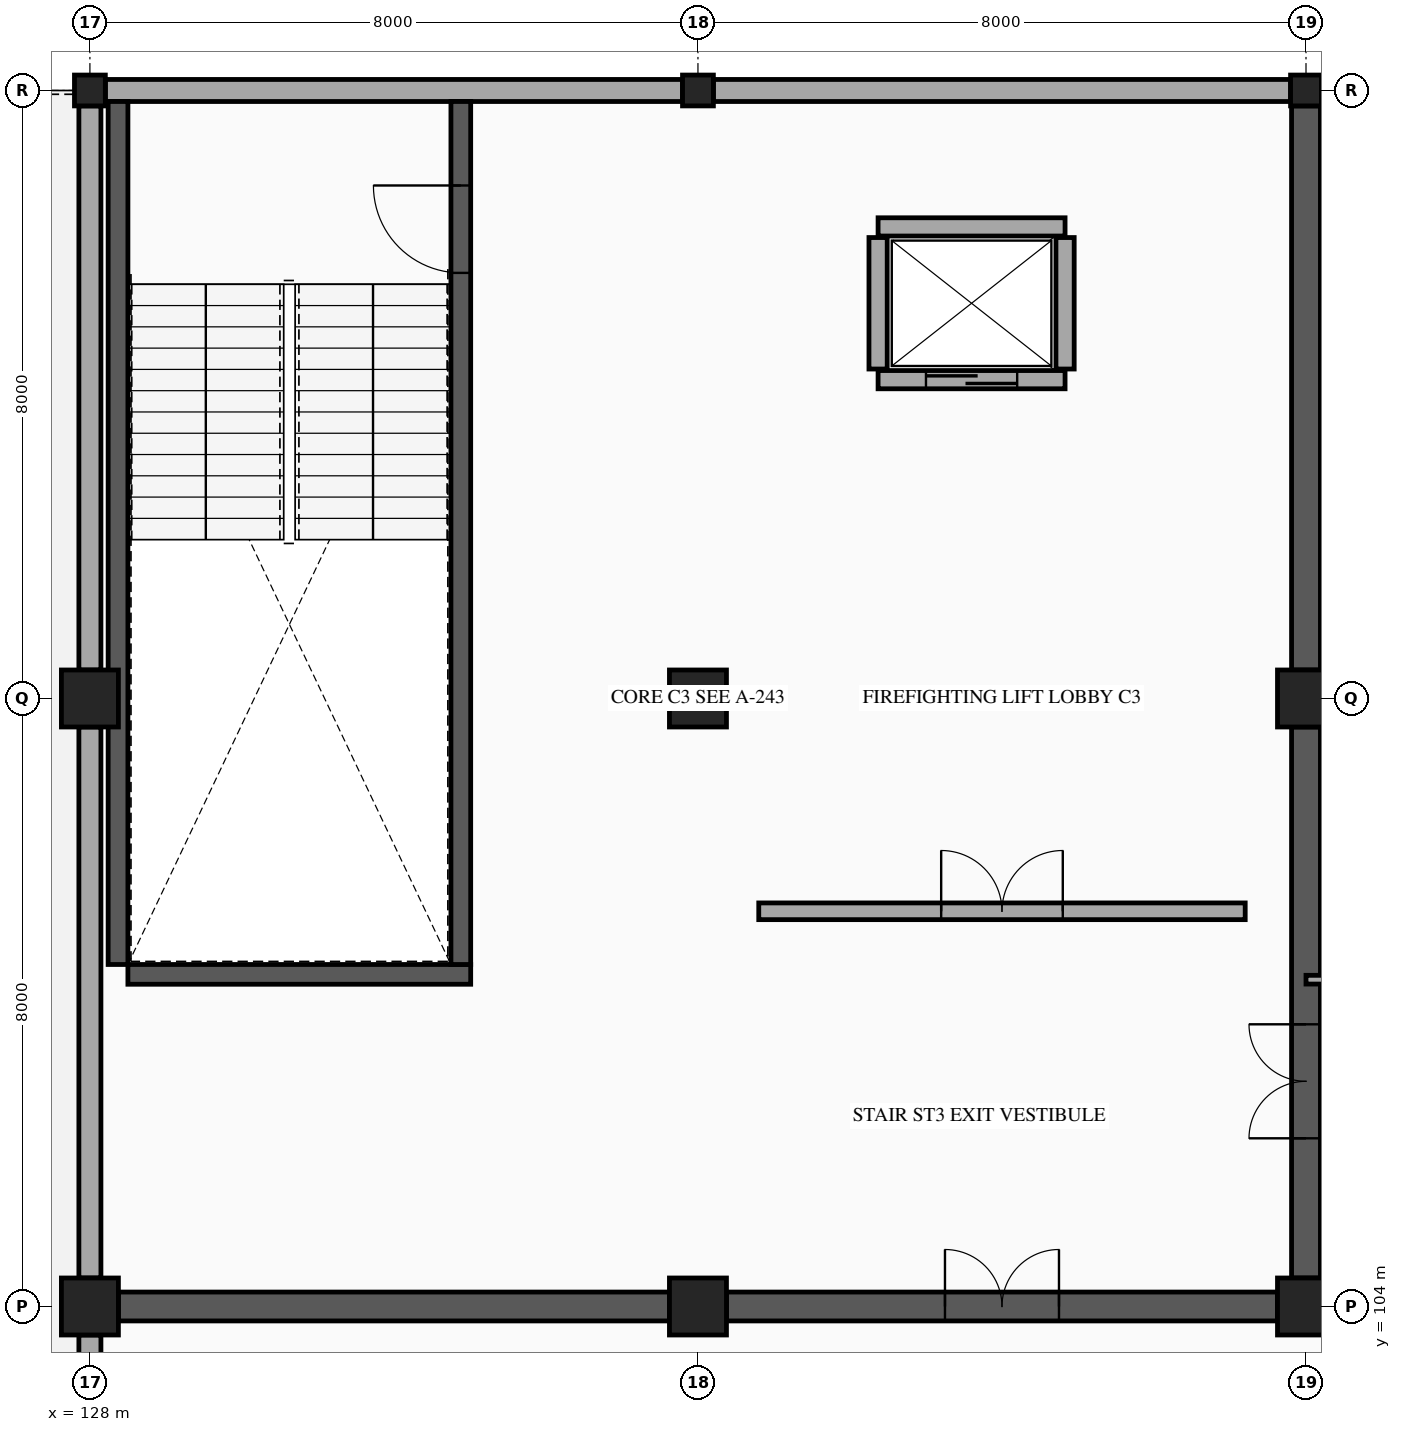
"""IFC4 building model, lengths in metres.
Left out: names, types, materials, properties, quantities, classifications, styles, units other than length and angle.
Written with IfcOpenShell. Run it as: python <this file> out.ifc"""

import sys

from ifc_helpers import new_model, si_unit, direction, frame, frame_2d, origin, origin_2d, place, context, subcontext, project, spatial, rectangle, hollow_rectangle, extrude, element, fill, save


model = new_model("IFC4")
c1 = context("Model", 3, precision=1e-05, world=origin(), true_north=direction((0.0, 1.0)))
c2 = subcontext(c1, "Body", "Model", "MODEL_VIEW")
j1 = project(units=[si_unit("LENGTHUNIT", "METRE"), si_unit("PLANEANGLEUNIT", "RADIAN")], contexts=[c1])
p1 = place(None, origin())
s1 = spatial("IfcSite", under=j1, at=p1, CompositionType="ELEMENT")
p2 = place(p1, origin())
s2 = spatial("IfcBuilding", under=s1, at=p2, CompositionType="ELEMENT")
p3 = place(p2, frame((0.0, 0.0, 19.4)))
s3 = spatial("IfcBuildingStorey", under=s2, at=p3, CompositionType="ELEMENT", Elevation=19.4)
for number, where, z_axis, x_axis in (
    (1, (128.0, 104.0, 0.0), (0.0, 0.0, 1.0), (1.0, 0.0, 0.0)),
    (2, (128.0, 112.0, 0.0), (0.0, 0.0, 1.0), (1.0, 0.0, 0.0)),
):
    element("IfcColumn", number, at=place(p3, frame(where, z_axis=z_axis, x_axis=x_axis)), inside=s3, PredefinedType="COLUMN", context=c2, shape_type="SweptSolid", body=[
        extrude(rectangle(XDim=0.75, YDim=0.75, at=origin_2d()), origin(), (0.0, 0.0, 1.0), 4.5),
    ])
p4 = place(p3, frame((128.0, 120.0, 0.0), z_axis=(0.0, 0.0, 1.0), x_axis=(1.0, 0.0, 0.0)))
e3 = element("IfcColumn", 3, at=p4, inside=s3, PredefinedType="COLUMN", context=c2, shape_type="SweptSolid", body=[
    extrude(hollow_rectangle(XDim=0.406, YDim=0.406, WallThickness=0.015, InnerFilletRadius=0.015, OuterFilletRadius=0.029, at=origin_2d()), origin(), (0.0, 0.0, 1.0), 4.5),
])
for number, where, z_axis, x_axis in (
    (4, (136.0, 104.0, 0.0), (0.0, 0.0, 1.0), (1.0, 0.0, 0.0)),
    (5, (136.0, 112.0, 0.0), (0.0, 0.0, 1.0), (1.0, 0.0, 0.0)),
):
    element("IfcColumn", number, at=place(p3, frame(where, z_axis=z_axis, x_axis=x_axis)), inside=s3, PredefinedType="COLUMN", context=c2, shape_type="SweptSolid", body=[
        extrude(rectangle(XDim=0.75, YDim=0.75, at=origin_2d()), origin(), (0.0, 0.0, 1.0), 4.5),
    ])
p5 = place(p3, frame((136.0, 120.0, 0.0), z_axis=(0.0, 0.0, 1.0), x_axis=(1.0, 0.0, 0.0)))
e6 = element("IfcColumn", 6, at=p5, inside=s3, PredefinedType="COLUMN", context=c2, shape_type="SweptSolid", body=[
    extrude(hollow_rectangle(XDim=0.406, YDim=0.406, WallThickness=0.015, InnerFilletRadius=0.015, OuterFilletRadius=0.029, at=origin_2d()), origin(), (0.0, 0.0, 1.0), 4.5),
])
for number, where, z_axis, x_axis in (
    (7, (144.0, 104.0, 0.0), (0.0, 0.0, 1.0), (1.0, 0.0, 0.0)),
    (8, (144.0, 112.0, 0.0), (0.0, 0.0, 1.0), (1.0, 0.0, 0.0)),
):
    element("IfcColumn", number, at=place(p3, frame(where, z_axis=z_axis, x_axis=x_axis)), inside=s3, PredefinedType="COLUMN", context=c2, shape_type="SweptSolid", body=[
        extrude(rectangle(XDim=0.75, YDim=0.75, at=origin_2d()), origin(), (0.0, 0.0, 1.0), 4.5),
    ])
p6 = place(p3, frame((144.0, 120.0, 0.0), z_axis=(0.0, 0.0, 1.0), x_axis=(1.0, 0.0, 0.0)))
e9 = element("IfcColumn", 9, at=p6, inside=s3, PredefinedType="COLUMN", context=c2, shape_type="SweptSolid", body=[
    extrude(hollow_rectangle(XDim=0.406, YDim=0.406, WallThickness=0.015, InnerFilletRadius=0.015, OuterFilletRadius=0.029, at=origin_2d()), origin(), (0.0, 0.0, 1.0), 4.5),
])
p7 = place(p3, frame((128.0, 96.375, 0.0), z_axis=(0.0, 0.0, 1.0), x_axis=(0.0, 1.0, 0.0)))
e10 = element("IfcWall", 10, at=p7, inside=s3, PredefinedType="STANDARD", context=c2, shape_type="SweptSolid", body=[
    extrude(rectangle(XDim=7.25, YDim=0.29, at=frame_2d((3.625, 0.0))), origin(), (0.0, 0.0, 1.0), 3.48),
])
p8 = place(p7, frame((3.075, 0.0, 0.0)))
e11 = element("IfcOpeningElement", 11, at=p8, cuts=e10, PredefinedType="OPENING", context=c2, shape_type="SweptSolid", body=[
    extrude(rectangle(XDim=1.1, YDim=2.15, at=frame_2d((0.55, 1.075))), frame((0.0, 0.155, 0.0), z_axis=(0.0, -1.0, 0.0), x_axis=(1.0, 0.0, 0.0)), (0.0, 0.0, 1.0), 0.31),
])
p9 = place(p3, frame((128.0, 104.375, 0.0), z_axis=(0.0, 0.0, 1.0), x_axis=(0.0, 1.0, 0.0)))
e12 = element("IfcWall", 12, at=p9, inside=s3, PredefinedType="STANDARD", context=c2, shape_type="SweptSolid", body=[
    extrude(rectangle(XDim=7.25, YDim=0.29, at=frame_2d((3.625, 0.0))), origin(), (0.0, 0.0, 1.0), 3.48),
])
p10 = place(p3, frame((128.0, 112.375, 0.0), z_axis=(0.0, 0.0, 1.0), x_axis=(0.0, 1.0, 0.0)))
e13 = element("IfcWall", 13, at=p10, inside=s3, PredefinedType="STANDARD", context=c2, shape_type="SweptSolid", body=[
    extrude(rectangle(XDim=7.422, YDim=0.29, at=frame_2d((3.711, 0.0))), origin(), (0.0, 0.0, 1.0), 3.48),
])
for number, where, z_axis, x_axis in (
    (14, (128.203, 120.0, 0.0), (0.0, 0.0, 1.0), (1.0, 0.0, 0.0)),
    (15, (136.203, 120.0, 0.0), (0.0, 0.0, 1.0), (1.0, 0.0, 0.0)),
):
    element("IfcWall", number, at=place(p3, frame(where, z_axis=z_axis, x_axis=x_axis)), inside=s3, PredefinedType="STANDARD", context=c2, shape_type="SweptSolid", body=[
        extrude(rectangle(XDim=7.594, YDim=0.29, at=frame_2d((3.797, 0.0))), origin(), (0.0, 0.0, 1.0), 3.48),
    ])
p11 = place(p3, frame((128.5, 108.37, 0.0), z_axis=(0.0, 0.0, 1.0), x_axis=(1.0, 0.0, 0.0)))
e16 = element("IfcWall", 16, at=p11, inside=s3, PredefinedType="SHEAR", context=c2, shape_type="SweptSolid", body=[
    extrude(rectangle(XDim=4.51, YDim=0.26, at=frame_2d((2.255, 0.0))), origin(), (0.0, 0.0, 1.0), 4.28),
])
p12 = place(p3, frame((128.37, 108.5, 0.0), z_axis=(0.0, 0.0, 1.0), x_axis=(0.0, 1.0, 0.0)))
e17 = element("IfcWall", 17, at=p12, inside=s3, PredefinedType="SHEAR", context=c2, shape_type="SweptSolid", body=[
    extrude(rectangle(XDim=11.355, YDim=0.26, at=frame_2d((5.677, 0.0))), origin(), (0.0, 0.0, 1.0), 4.28),
])
p13 = place(p3, frame((132.88, 108.5, 0.0), z_axis=(0.0, 0.0, 1.0), x_axis=(0.0, 1.0, 0.0)))
e18 = element("IfcWall", 18, at=p13, inside=s3, PredefinedType="SHEAR", context=c2, shape_type="SweptSolid", body=[
    extrude(rectangle(XDim=11.355, YDim=0.26, at=frame_2d((5.677, 0.0))), origin(), (0.0, 0.0, 1.0), 4.28),
])
p14 = place(p13, frame((9.1, 0.0, 0.0)))
e19 = element("IfcOpeningElement", 19, at=p14, cuts=e18, PredefinedType="OPENING", context=c2, shape_type="SweptSolid", body=[
    extrude(rectangle(XDim=1.15, YDim=2.15, at=frame_2d((0.575, 1.075))), frame((0.0, 0.14, 0.0), z_axis=(0.0, -1.0, 0.0), x_axis=(1.0, 0.0, 0.0)), (0.0, 0.0, 1.0), 0.28),
])
p15 = place(p3, frame((128.375, 104.0, 0.0), z_axis=(0.0, 0.0, 1.0), x_axis=(1.0, 0.0, 0.0)))
e20 = element("IfcWall", 20, at=p15, inside=s3, PredefinedType="SHEAR", context=c2, shape_type="SweptSolid", body=[
    extrude(rectangle(XDim=7.25, YDim=0.38, at=frame_2d((3.625, 0.0))), origin(), (0.0, 0.0, 1.0), 4.28),
])
p16 = place(p3, frame((136.375, 104.0, 0.0), z_axis=(0.0, 0.0, 1.0), x_axis=(1.0, 0.0, 0.0)))
e21 = element("IfcWall", 21, at=p16, inside=s3, PredefinedType="SHEAR", context=c2, shape_type="SweptSolid", body=[
    extrude(rectangle(XDim=7.25, YDim=0.38, at=frame_2d((3.625, 0.0))), origin(), (0.0, 0.0, 1.0), 4.28),
])
p17 = place(p16, frame((2.875, 0.0, 0.0)))
e22 = element("IfcOpeningElement", 22, at=p17, cuts=e21, PredefinedType="OPENING", context=c2, shape_type="SweptSolid", body=[
    extrude(rectangle(XDim=1.5, YDim=2.15, at=frame_2d((0.75, 1.075))), frame((0.0, 0.2, 0.0), z_axis=(0.0, -1.0, 0.0), x_axis=(1.0, 0.0, 0.0)), (0.0, 0.0, 1.0), 0.4),
])
p18 = place(p3, frame((144.0, 104.375, 0.0), z_axis=(0.0, 0.0, 1.0), x_axis=(0.0, 1.0, 0.0)))
e23 = element("IfcWall", 23, at=p18, inside=s3, PredefinedType="SHEAR", context=c2, shape_type="SweptSolid", body=[
    extrude(rectangle(XDim=7.25, YDim=0.38, at=frame_2d((3.625, 0.0))), origin(), (0.0, 0.0, 1.0), 4.28),
])
p19 = place(p18, frame((1.838, 0.0, 0.0)))
e24 = element("IfcOpeningElement", 24, at=p19, cuts=e23, PredefinedType="OPENING", context=c2, shape_type="SweptSolid", body=[
    extrude(rectangle(XDim=1.5, YDim=2.15, at=frame_2d((0.75, 1.075))), frame((0.0, 0.2, 0.0), z_axis=(0.0, -1.0, 0.0), x_axis=(1.0, 0.0, 0.0)), (0.0, 0.0, 1.0), 0.4),
])
p20 = place(p3, frame((144.0, 112.375, 0.0), z_axis=(0.0, 0.0, 1.0), x_axis=(0.0, 1.0, 0.0)))
e25 = element("IfcWall", 25, at=p20, inside=s3, PredefinedType="SHEAR", context=c2, shape_type="SweptSolid", body=[
    extrude(rectangle(XDim=7.422, YDim=0.38, at=frame_2d((3.711, 0.0))), origin(), (0.0, 0.0, 1.0), 4.28),
])
p21 = place(p3, frame((138.37, 116.195, 0.0), z_axis=(0.0, 0.0, 1.0), x_axis=(1.0, 0.0, 0.0)))
e26 = element("IfcWall", 26, at=p21, inside=s3, PredefinedType="PARTITIONING", context=c2, shape_type="SweptSolid", body=[
    extrude(rectangle(XDim=2.46, YDim=0.24, at=frame_2d((1.23, 0.0))), origin(), (0.0, 0.0, 1.0), 4.28),
])
p22 = place(p21, frame((0.63, 0.0, 0.0)))
e27 = element("IfcOpeningElement", 27, at=p22, cuts=e26, PredefinedType="OPENING", context=c2, shape_type="SweptSolid", body=[
    extrude(rectangle(XDim=1.2, YDim=2.15, at=frame_2d((0.6, 1.075))), frame((0.0, 0.13, 0.0), z_axis=(0.0, -1.0, 0.0), x_axis=(1.0, 0.0, 0.0)), (0.0, 0.0, 1.0), 0.26),
])
p23 = place(p3, frame((138.37, 118.205, 0.0), z_axis=(0.0, 0.0, 1.0), x_axis=(1.0, 0.0, 0.0)))
e28 = element("IfcWall", 28, at=p23, inside=s3, PredefinedType="PARTITIONING", context=c2, shape_type="SweptSolid", body=[
    extrude(rectangle(XDim=2.46, YDim=0.24, at=frame_2d((1.23, 0.0))), origin(), (0.0, 0.0, 1.0), 4.28),
])
for number, where, z_axis, x_axis in (
    (29, (138.37, 116.335, 0.0), (0.0, 0.0, 1.0), (0.0, 1.0, 0.0)),
    (30, (140.83, 116.335, 0.0), (0.0, 0.0, 1.0), (0.0, 1.0, 0.0)),
):
    element("IfcWall", number, at=place(p3, frame(where, z_axis=z_axis, x_axis=x_axis)), inside=s3, PredefinedType="PARTITIONING", context=c2, shape_type="SweptSolid", body=[
        extrude(rectangle(XDim=1.73, YDim=0.24, at=frame_2d((0.865, 0.0))), origin(), (0.0, 0.0, 1.0), 4.28),
    ])
p24 = place(p3, frame((136.8, 109.2, 0.0), z_axis=(0.0, 0.0, 1.0), x_axis=(1.0, 0.0, 0.0)))
e31 = element("IfcWall", 31, at=p24, inside=s3, PredefinedType="PARTITIONING", context=c2, shape_type="SweptSolid", body=[
    extrude(rectangle(XDim=6.4, YDim=0.22, at=frame_2d((3.2, 0.0))), origin(), (0.0, 0.0, 1.0), 3.48),
])
p25 = place(p24, frame((2.4, 0.0, 0.0)))
e32 = element("IfcOpeningElement", 32, at=p25, cuts=e31, PredefinedType="OPENING", context=c2, shape_type="SweptSolid", body=[
    extrude(rectangle(XDim=1.6, YDim=2.15, at=frame_2d((0.8, 1.075))), frame((0.0, 0.12, 0.0), z_axis=(0.0, -1.0, 0.0), x_axis=(1.0, 0.0, 0.0)), (0.0, 0.0, 1.0), 0.24),
])
p26 = place(p3, frame((144.0, 108.3, 0.0), z_axis=(0.0, 0.0, 1.0), x_axis=(1.0, 0.0, 0.0)))
e33 = element("IfcWall", 33, at=p26, inside=s3, PredefinedType="PARTITIONING", context=c2, shape_type="SweptSolid", body=[
    extrude(rectangle(XDim=31.85, YDim=0.115, at=frame_2d((15.925, 0.0))), origin(), (0.0, 0.0, 1.0), 3.48),
])
p27 = place(p26, frame((27.53, 0.0, 0.0)))
e34 = element("IfcOpeningElement", 34, at=p27, cuts=e33, PredefinedType="OPENING", context=c2, shape_type="SweptSolid", body=[
    extrude(rectangle(XDim=0.95, YDim=2.1, at=frame_2d((0.475, 1.05))), frame((0.0, 0.067, 0.0), z_axis=(0.0, -1.0, 0.0), x_axis=(1.0, 0.0, 0.0)), (0.0, 0.0, 1.0), 0.135),
])
p28 = place(p14, origin())
e35 = element("IfcDoor", 35, at=p28, inside=s3, OperationType="SINGLE_SWING_RIGHT", PredefinedType="DOOR", context=c2, shape_type="SweptSolid", body=[
    extrude(rectangle(XDim=1.15, YDim=2.15, at=frame_2d((0.575, 1.075))), frame((0.0, 0.025, 0.0), z_axis=(0.0, -1.0, 0.0), x_axis=(1.0, 0.0, 0.0)), (0.0, 0.0, 1.0), 0.05),
])
fill(e19, e35)
p29 = place(p17, origin())
e36 = element("IfcDoor", 36, at=p29, inside=s3, OperationType="DOUBLE_DOOR_SINGLE_SWING", PredefinedType="DOOR", context=c2, shape_type="SweptSolid", body=[
    extrude(rectangle(XDim=1.5, YDim=2.15, at=frame_2d((0.75, 1.075))), frame((0.0, 0.025, 0.0), z_axis=(0.0, -1.0, 0.0), x_axis=(1.0, 0.0, 0.0)), (0.0, 0.0, 1.0), 0.05),
])
fill(e22, e36)
p30 = place(p19, origin())
e37 = element("IfcDoor", 37, at=p30, inside=s3, OperationType="DOUBLE_DOOR_SINGLE_SWING", PredefinedType="DOOR", context=c2, shape_type="SweptSolid", body=[
    extrude(rectangle(XDim=1.5, YDim=2.15, at=frame_2d((0.75, 1.075))), frame((0.0, 0.025, 0.0), z_axis=(0.0, -1.0, 0.0), x_axis=(1.0, 0.0, 0.0)), (0.0, 0.0, 1.0), 0.05),
])
fill(e24, e37)
p31 = place(p22, origin())
e38 = element("IfcDoor", 38, at=p31, inside=s3, OperationType="SLIDING_TO_LEFT", PredefinedType="DOOR", context=c2, shape_type="SweptSolid", body=[
    extrude(rectangle(XDim=1.2, YDim=2.15, at=frame_2d((0.6, 1.075))), frame((0.0, 0.025, 0.0), z_axis=(0.0, -1.0, 0.0), x_axis=(1.0, 0.0, 0.0)), (0.0, 0.0, 1.0), 0.05),
])
fill(e27, e38)
p32 = place(p25, origin())
e39 = element("IfcDoor", 39, at=p32, inside=s3, OperationType="DOUBLE_DOOR_SINGLE_SWING", PredefinedType="DOOR", context=c2, shape_type="SweptSolid", body=[
    extrude(rectangle(XDim=1.6, YDim=2.15, at=frame_2d((0.8, 1.075))), frame((0.0, 0.025, 0.0), z_axis=(0.0, -1.0, 0.0), x_axis=(1.0, 0.0, 0.0)), (0.0, 0.0, 1.0), 0.05),
])
fill(e32, e39)
save(model, sys.argv[1])
